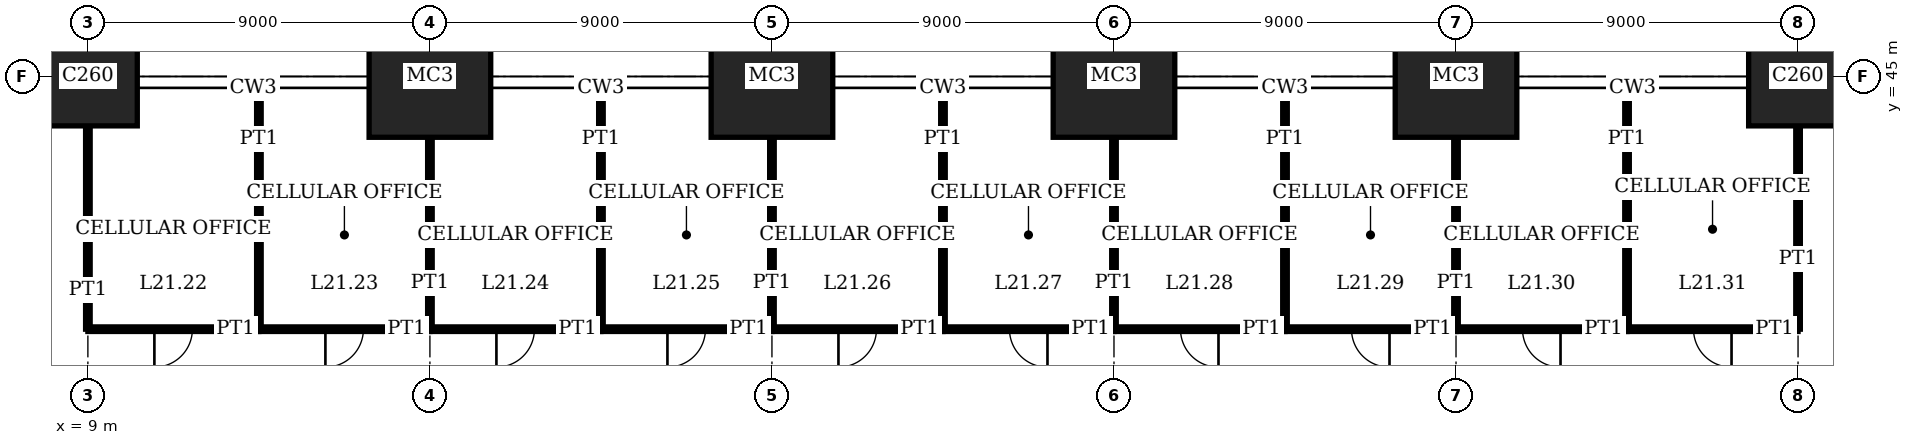
"""IFC4 building model, lengths in metres.
Left out: names, types, materials, properties, quantities, classifications, styles, units other than length and angle.
Written with IfcOpenShell. Run it as: python <this file> out.ifc"""

import sys

from ifc_helpers import new_model, si_unit, direction, frame, frame_2d, origin, origin_2d, place, context, subcontext, project, spatial, rectangle, extrude, element, fill, save


model = new_model("IFC4")
c1 = context("Model", 3, precision=1e-05, world=origin(), true_north=direction((0.0, 1.0)))
c2 = subcontext(c1, "Body", "Model", "MODEL_VIEW")
j1 = project(units=[si_unit("LENGTHUNIT", "METRE"), si_unit("PLANEANGLEUNIT", "RADIAN")], contexts=[c1])
p1 = place(None, origin())
s1 = spatial("IfcSite", under=j1, at=p1, CompositionType="ELEMENT")
p2 = place(p1, origin())
s2 = spatial("IfcBuilding", under=s1, at=p2, CompositionType="ELEMENT")
p3 = place(p2, frame((0.0, 0.0, 89.0)))
s3 = spatial("IfcBuildingStorey", under=s2, at=p3, CompositionType="ELEMENT", Elevation=89.0)
p4 = place(p3, frame((9.0, 45.0, 0.0), z_axis=(0.0, 0.0, 1.0), x_axis=(1.0, 0.0, 0.0)))
e1 = element("IfcColumn", 1, at=p4, inside=s3, PredefinedType="COLUMN", context=c2, shape_type="SweptSolid", body=[
    extrude(rectangle(XDim=2.6, YDim=2.6, at=origin_2d()), origin(), (0.0, 0.0, 1.0), 4.0),
])
for number, where, z_axis, x_axis in (
    (2, (18.0, 45.0, 0.0), (0.0, 0.0, 1.0), (1.0, 0.0, 0.0)),
    (3, (27.0, 45.0, 0.0), (0.0, 0.0, 1.0), (1.0, 0.0, 0.0)),
    (4, (36.0, 45.0, 0.0), (0.0, 0.0, 1.0), (1.0, 0.0, 0.0)),
    (5, (45.0, 45.0, 0.0), (0.0, 0.0, 1.0), (1.0, 0.0, 0.0)),
):
    element("IfcColumn", number, at=place(p3, frame(where, z_axis=z_axis, x_axis=x_axis)), inside=s3, PredefinedType="COLUMN", context=c2, shape_type="SweptSolid", body=[
        extrude(rectangle(XDim=3.2, YDim=3.2, at=origin_2d()), origin(), (0.0, 0.0, 1.0), 4.0),
    ])
p5 = place(p3, frame((54.0, 45.0, 0.0), z_axis=(0.0, 0.0, 1.0), x_axis=(1.0, 0.0, 0.0)))
e6 = element("IfcColumn", 6, at=p5, inside=s3, PredefinedType="COLUMN", context=c2, shape_type="SweptSolid", body=[
    extrude(rectangle(XDim=2.6, YDim=2.6, at=origin_2d()), origin(), (0.0, 0.0, 1.0), 4.0),
])
p6 = place(p3, frame((9.0, 38.35, 0.0), z_axis=(0.0, 0.0, 1.0), x_axis=(1.0, 0.0, 0.0)))
e7 = element("IfcWall", 7, at=p6, inside=s3, PredefinedType="PARTITIONING", context=c2, shape_type="SweptSolid", body=[
    extrude(rectangle(XDim=4.5, YDim=0.12, at=frame_2d((2.25, 0.0))), origin(), (0.0, 0.0, 1.0), 3.75),
])
p7 = place(p6, frame((1.75, 0.0, 0.0)))
e8 = element("IfcOpeningElement", 8, at=p7, cuts=e7, PredefinedType="OPENING", context=c2, shape_type="SweptSolid", body=[
    extrude(rectangle(XDim=1.0, YDim=2.4, at=frame_2d((0.5, 1.2))), frame((0.0, 0.07, 0.0), z_axis=(0.0, -1.0, 0.0), x_axis=(1.0, 0.0, 0.0)), (0.0, 0.0, 1.0), 0.14),
])
p8 = place(p3, frame((13.5, 38.35, 0.0), z_axis=(0.0, 0.0, 1.0), x_axis=(1.0, 0.0, 0.0)))
e9 = element("IfcWall", 9, at=p8, inside=s3, PredefinedType="PARTITIONING", context=c2, shape_type="SweptSolid", body=[
    extrude(rectangle(XDim=4.5, YDim=0.12, at=frame_2d((2.25, 0.0))), origin(), (0.0, 0.0, 1.0), 3.75),
])
p9 = place(p8, frame((1.75, 0.0, 0.0)))
e10 = element("IfcOpeningElement", 10, at=p9, cuts=e9, PredefinedType="OPENING", context=c2, shape_type="SweptSolid", body=[
    extrude(rectangle(XDim=1.0, YDim=2.4, at=frame_2d((0.5, 1.2))), frame((0.0, 0.07, 0.0), z_axis=(0.0, -1.0, 0.0), x_axis=(1.0, 0.0, 0.0)), (0.0, 0.0, 1.0), 0.14),
])
p10 = place(p3, frame((18.0, 38.35, 0.0), z_axis=(0.0, 0.0, 1.0), x_axis=(1.0, 0.0, 0.0)))
e11 = element("IfcWall", 11, at=p10, inside=s3, PredefinedType="PARTITIONING", context=c2, shape_type="SweptSolid", body=[
    extrude(rectangle(XDim=4.5, YDim=0.12, at=frame_2d((2.25, 0.0))), origin(), (0.0, 0.0, 1.0), 3.75),
])
p11 = place(p10, frame((1.75, 0.0, 0.0)))
e12 = element("IfcOpeningElement", 12, at=p11, cuts=e11, PredefinedType="OPENING", context=c2, shape_type="SweptSolid", body=[
    extrude(rectangle(XDim=1.0, YDim=2.4, at=frame_2d((0.5, 1.2))), frame((0.0, 0.07, 0.0), z_axis=(0.0, -1.0, 0.0), x_axis=(1.0, 0.0, 0.0)), (0.0, 0.0, 1.0), 0.14),
])
p12 = place(p3, frame((22.5, 38.35, 0.0), z_axis=(0.0, 0.0, 1.0), x_axis=(1.0, 0.0, 0.0)))
e13 = element("IfcWall", 13, at=p12, inside=s3, PredefinedType="PARTITIONING", context=c2, shape_type="SweptSolid", body=[
    extrude(rectangle(XDim=4.5, YDim=0.12, at=frame_2d((2.25, 0.0))), origin(), (0.0, 0.0, 1.0), 3.75),
])
p13 = place(p12, frame((1.75, 0.0, 0.0)))
e14 = element("IfcOpeningElement", 14, at=p13, cuts=e13, PredefinedType="OPENING", context=c2, shape_type="SweptSolid", body=[
    extrude(rectangle(XDim=1.0, YDim=2.4, at=frame_2d((0.5, 1.2))), frame((0.0, 0.07, 0.0), z_axis=(0.0, -1.0, 0.0), x_axis=(1.0, 0.0, 0.0)), (0.0, 0.0, 1.0), 0.14),
])
p14 = place(p3, frame((27.0, 38.35, 0.0), z_axis=(0.0, 0.0, 1.0), x_axis=(1.0, 0.0, 0.0)))
e15 = element("IfcWall", 15, at=p14, inside=s3, PredefinedType="PARTITIONING", context=c2, shape_type="SweptSolid", body=[
    extrude(rectangle(XDim=4.5, YDim=0.12, at=frame_2d((2.25, 0.0))), origin(), (0.0, 0.0, 1.0), 3.75),
])
p15 = place(p14, frame((1.75, 0.0, 0.0)))
e16 = element("IfcOpeningElement", 16, at=p15, cuts=e15, PredefinedType="OPENING", context=c2, shape_type="SweptSolid", body=[
    extrude(rectangle(XDim=1.0, YDim=2.4, at=frame_2d((0.5, 1.2))), frame((0.0, 0.07, 0.0), z_axis=(0.0, -1.0, 0.0), x_axis=(1.0, 0.0, 0.0)), (0.0, 0.0, 1.0), 0.14),
])
p16 = place(p3, frame((31.5, 38.35, 0.0), z_axis=(0.0, 0.0, 1.0), x_axis=(1.0, 0.0, 0.0)))
e17 = element("IfcWall", 17, at=p16, inside=s3, PredefinedType="PARTITIONING", context=c2, shape_type="SweptSolid", body=[
    extrude(rectangle(XDim=4.5, YDim=0.12, at=frame_2d((2.25, 0.0))), origin(), (0.0, 0.0, 1.0), 3.75),
])
p17 = place(p16, frame((1.75, 0.0, 0.0)))
e18 = element("IfcOpeningElement", 18, at=p17, cuts=e17, PredefinedType="OPENING", context=c2, shape_type="SweptSolid", body=[
    extrude(rectangle(XDim=1.0, YDim=2.4, at=frame_2d((0.5, 1.2))), frame((0.0, 0.07, 0.0), z_axis=(0.0, -1.0, 0.0), x_axis=(1.0, 0.0, 0.0)), (0.0, 0.0, 1.0), 0.14),
])
p18 = place(p3, frame((36.0, 38.35, 0.0), z_axis=(0.0, 0.0, 1.0), x_axis=(1.0, 0.0, 0.0)))
e19 = element("IfcWall", 19, at=p18, inside=s3, PredefinedType="PARTITIONING", context=c2, shape_type="SweptSolid", body=[
    extrude(rectangle(XDim=4.5, YDim=0.12, at=frame_2d((2.25, 0.0))), origin(), (0.0, 0.0, 1.0), 3.75),
])
p19 = place(p18, frame((1.75, 0.0, 0.0)))
e20 = element("IfcOpeningElement", 20, at=p19, cuts=e19, PredefinedType="OPENING", context=c2, shape_type="SweptSolid", body=[
    extrude(rectangle(XDim=1.0, YDim=2.4, at=frame_2d((0.5, 1.2))), frame((0.0, 0.07, 0.0), z_axis=(0.0, -1.0, 0.0), x_axis=(1.0, 0.0, 0.0)), (0.0, 0.0, 1.0), 0.14),
])
p20 = place(p3, frame((40.5, 38.35, 0.0), z_axis=(0.0, 0.0, 1.0), x_axis=(1.0, 0.0, 0.0)))
e21 = element("IfcWall", 21, at=p20, inside=s3, PredefinedType="PARTITIONING", context=c2, shape_type="SweptSolid", body=[
    extrude(rectangle(XDim=4.5, YDim=0.12, at=frame_2d((2.25, 0.0))), origin(), (0.0, 0.0, 1.0), 3.75),
])
p21 = place(p20, frame((1.75, 0.0, 0.0)))
e22 = element("IfcOpeningElement", 22, at=p21, cuts=e21, PredefinedType="OPENING", context=c2, shape_type="SweptSolid", body=[
    extrude(rectangle(XDim=1.0, YDim=2.4, at=frame_2d((0.5, 1.2))), frame((0.0, 0.07, 0.0), z_axis=(0.0, -1.0, 0.0), x_axis=(1.0, 0.0, 0.0)), (0.0, 0.0, 1.0), 0.14),
])
p22 = place(p3, frame((45.0, 38.35, 0.0), z_axis=(0.0, 0.0, 1.0), x_axis=(1.0, 0.0, 0.0)))
e23 = element("IfcWall", 23, at=p22, inside=s3, PredefinedType="PARTITIONING", context=c2, shape_type="SweptSolid", body=[
    extrude(rectangle(XDim=4.5, YDim=0.12, at=frame_2d((2.25, 0.0))), origin(), (0.0, 0.0, 1.0), 3.75),
])
p23 = place(p22, frame((1.75, 0.0, 0.0)))
e24 = element("IfcOpeningElement", 24, at=p23, cuts=e23, PredefinedType="OPENING", context=c2, shape_type="SweptSolid", body=[
    extrude(rectangle(XDim=1.0, YDim=2.4, at=frame_2d((0.5, 1.2))), frame((0.0, 0.07, 0.0), z_axis=(0.0, -1.0, 0.0), x_axis=(1.0, 0.0, 0.0)), (0.0, 0.0, 1.0), 0.14),
])
p24 = place(p3, frame((49.5, 38.35, 0.0), z_axis=(0.0, 0.0, 1.0), x_axis=(1.0, 0.0, 0.0)))
e25 = element("IfcWall", 25, at=p24, inside=s3, PredefinedType="PARTITIONING", context=c2, shape_type="SweptSolid", body=[
    extrude(rectangle(XDim=4.5, YDim=0.12, at=frame_2d((2.25, 0.0))), origin(), (0.0, 0.0, 1.0), 3.75),
])
p25 = place(p24, frame((1.75, 0.0, 0.0)))
e26 = element("IfcOpeningElement", 26, at=p25, cuts=e25, PredefinedType="OPENING", context=c2, shape_type="SweptSolid", body=[
    extrude(rectangle(XDim=1.0, YDim=2.4, at=frame_2d((0.5, 1.2))), frame((0.0, 0.07, 0.0), z_axis=(0.0, -1.0, 0.0), x_axis=(1.0, 0.0, 0.0)), (0.0, 0.0, 1.0), 0.14),
])
p26 = place(p3, frame((9.0, 38.35, 0.0), z_axis=(0.0, 0.0, 1.0), x_axis=(0.0, 1.0, 0.0)))
e27 = element("IfcWall", 27, at=p26, inside=s3, PredefinedType="PARTITIONING", context=c2, shape_type="SweptSolid", body=[
    extrude(rectangle(XDim=5.35, YDim=0.12, at=frame_2d((2.675, 0.0))), origin(), (0.0, 0.0, 1.0), 3.05),
])
p27 = place(p3, frame((13.5, 38.35, 0.0), z_axis=(0.0, 0.0, 1.0), x_axis=(0.0, 1.0, 0.0)))
e28 = element("IfcWall", 28, at=p27, inside=s3, PredefinedType="PARTITIONING", context=c2, shape_type="SweptSolid", body=[
    extrude(rectangle(XDim=6.34, YDim=0.12, at=frame_2d((3.17, 0.0))), origin(), (0.0, 0.0, 1.0), 3.75),
])
p28 = place(p3, frame((18.0, 38.35, 0.0), z_axis=(0.0, 0.0, 1.0), x_axis=(0.0, 1.0, 0.0)))
e29 = element("IfcWall", 29, at=p28, inside=s3, PredefinedType="PARTITIONING", context=c2, shape_type="SweptSolid", body=[
    extrude(rectangle(XDim=5.05, YDim=0.12, at=frame_2d((2.525, 0.0))), origin(), (0.0, 0.0, 1.0), 3.05),
])
p29 = place(p3, frame((22.5, 38.35, 0.0), z_axis=(0.0, 0.0, 1.0), x_axis=(0.0, 1.0, 0.0)))
e30 = element("IfcWall", 30, at=p29, inside=s3, PredefinedType="PARTITIONING", context=c2, shape_type="SweptSolid", body=[
    extrude(rectangle(XDim=6.34, YDim=0.12, at=frame_2d((3.17, 0.0))), origin(), (0.0, 0.0, 1.0), 3.75),
])
p30 = place(p3, frame((27.0, 38.35, 0.0), z_axis=(0.0, 0.0, 1.0), x_axis=(0.0, 1.0, 0.0)))
e31 = element("IfcWall", 31, at=p30, inside=s3, PredefinedType="PARTITIONING", context=c2, shape_type="SweptSolid", body=[
    extrude(rectangle(XDim=5.05, YDim=0.12, at=frame_2d((2.525, 0.0))), origin(), (0.0, 0.0, 1.0), 3.05),
])
p31 = place(p3, frame((31.5, 38.35, 0.0), z_axis=(0.0, 0.0, 1.0), x_axis=(0.0, 1.0, 0.0)))
e32 = element("IfcWall", 32, at=p31, inside=s3, PredefinedType="PARTITIONING", context=c2, shape_type="SweptSolid", body=[
    extrude(rectangle(XDim=6.34, YDim=0.12, at=frame_2d((3.17, 0.0))), origin(), (0.0, 0.0, 1.0), 3.75),
])
p32 = place(p3, frame((36.0, 38.35, 0.0), z_axis=(0.0, 0.0, 1.0), x_axis=(0.0, 1.0, 0.0)))
e33 = element("IfcWall", 33, at=p32, inside=s3, PredefinedType="PARTITIONING", context=c2, shape_type="SweptSolid", body=[
    extrude(rectangle(XDim=5.05, YDim=0.12, at=frame_2d((2.525, 0.0))), origin(), (0.0, 0.0, 1.0), 3.05),
])
p33 = place(p3, frame((40.5, 38.35, 0.0), z_axis=(0.0, 0.0, 1.0), x_axis=(0.0, 1.0, 0.0)))
e34 = element("IfcWall", 34, at=p33, inside=s3, PredefinedType="PARTITIONING", context=c2, shape_type="SweptSolid", body=[
    extrude(rectangle(XDim=6.34, YDim=0.12, at=frame_2d((3.17, 0.0))), origin(), (0.0, 0.0, 1.0), 3.75),
])
p34 = place(p3, frame((45.0, 38.35, 0.0), z_axis=(0.0, 0.0, 1.0), x_axis=(0.0, 1.0, 0.0)))
e35 = element("IfcWall", 35, at=p34, inside=s3, PredefinedType="PARTITIONING", context=c2, shape_type="SweptSolid", body=[
    extrude(rectangle(XDim=5.05, YDim=0.12, at=frame_2d((2.525, 0.0))), origin(), (0.0, 0.0, 1.0), 3.05),
])
p35 = place(p3, frame((49.5, 38.35, 0.0), z_axis=(0.0, 0.0, 1.0), x_axis=(0.0, 1.0, 0.0)))
e36 = element("IfcWall", 36, at=p35, inside=s3, PredefinedType="PARTITIONING", context=c2, shape_type="SweptSolid", body=[
    extrude(rectangle(XDim=6.34, YDim=0.12, at=frame_2d((3.17, 0.0))), origin(), (0.0, 0.0, 1.0), 3.75),
])
p36 = place(p3, frame((54.0, 38.35, 0.0), z_axis=(0.0, 0.0, 1.0), x_axis=(0.0, 1.0, 0.0)))
e37 = element("IfcWall", 37, at=p36, inside=s3, PredefinedType="PARTITIONING", context=c2, shape_type="SweptSolid", body=[
    extrude(rectangle(XDim=5.35, YDim=0.12, at=frame_2d((2.675, 0.0))), origin(), (0.0, 0.0, 1.0), 3.05),
])
p37 = place(p7, origin())
e38 = element("IfcDoor", 38, at=p37, inside=s3, OperationType="SINGLE_SWING_LEFT", PredefinedType="DOOR", context=c2, shape_type="SweptSolid", body=[
    extrude(rectangle(XDim=1.0, YDim=2.4, at=frame_2d((0.5, 1.2))), frame((0.0, 0.025, 0.0), z_axis=(0.0, -1.0, 0.0), x_axis=(1.0, 0.0, 0.0)), (0.0, 0.0, 1.0), 0.05),
])
fill(e8, e38)
p38 = place(p9, origin())
e39 = element("IfcDoor", 39, at=p38, inside=s3, OperationType="SINGLE_SWING_LEFT", PredefinedType="DOOR", context=c2, shape_type="SweptSolid", body=[
    extrude(rectangle(XDim=1.0, YDim=2.4, at=frame_2d((0.5, 1.2))), frame((0.0, 0.025, 0.0), z_axis=(0.0, -1.0, 0.0), x_axis=(1.0, 0.0, 0.0)), (0.0, 0.0, 1.0), 0.05),
])
fill(e10, e39)
p39 = place(p11, origin())
e40 = element("IfcDoor", 40, at=p39, inside=s3, OperationType="SINGLE_SWING_LEFT", PredefinedType="DOOR", context=c2, shape_type="SweptSolid", body=[
    extrude(rectangle(XDim=1.0, YDim=2.4, at=frame_2d((0.5, 1.2))), frame((0.0, 0.025, 0.0), z_axis=(0.0, -1.0, 0.0), x_axis=(1.0, 0.0, 0.0)), (0.0, 0.0, 1.0), 0.05),
])
fill(e12, e40)
p40 = place(p13, origin())
e41 = element("IfcDoor", 41, at=p40, inside=s3, OperationType="SINGLE_SWING_LEFT", PredefinedType="DOOR", context=c2, shape_type="SweptSolid", body=[
    extrude(rectangle(XDim=1.0, YDim=2.4, at=frame_2d((0.5, 1.2))), frame((0.0, 0.025, 0.0), z_axis=(0.0, -1.0, 0.0), x_axis=(1.0, 0.0, 0.0)), (0.0, 0.0, 1.0), 0.05),
])
fill(e14, e41)
p41 = place(p15, origin())
e42 = element("IfcDoor", 42, at=p41, inside=s3, OperationType="SINGLE_SWING_LEFT", PredefinedType="DOOR", context=c2, shape_type="SweptSolid", body=[
    extrude(rectangle(XDim=1.0, YDim=2.4, at=frame_2d((0.5, 1.2))), frame((0.0, 0.025, 0.0), z_axis=(0.0, -1.0, 0.0), x_axis=(1.0, 0.0, 0.0)), (0.0, 0.0, 1.0), 0.05),
])
fill(e16, e42)
p42 = place(p17, origin())
e43 = element("IfcDoor", 43, at=p42, inside=s3, OperationType="SINGLE_SWING_RIGHT", PredefinedType="DOOR", context=c2, shape_type="SweptSolid", body=[
    extrude(rectangle(XDim=1.0, YDim=2.4, at=frame_2d((0.5, 1.2))), frame((0.0, 0.025, 0.0), z_axis=(0.0, -1.0, 0.0), x_axis=(1.0, 0.0, 0.0)), (0.0, 0.0, 1.0), 0.05),
])
fill(e18, e43)
p43 = place(p19, origin())
e44 = element("IfcDoor", 44, at=p43, inside=s3, OperationType="SINGLE_SWING_RIGHT", PredefinedType="DOOR", context=c2, shape_type="SweptSolid", body=[
    extrude(rectangle(XDim=1.0, YDim=2.4, at=frame_2d((0.5, 1.2))), frame((0.0, 0.025, 0.0), z_axis=(0.0, -1.0, 0.0), x_axis=(1.0, 0.0, 0.0)), (0.0, 0.0, 1.0), 0.05),
])
fill(e20, e44)
p44 = place(p21, origin())
e45 = element("IfcDoor", 45, at=p44, inside=s3, OperationType="SINGLE_SWING_RIGHT", PredefinedType="DOOR", context=c2, shape_type="SweptSolid", body=[
    extrude(rectangle(XDim=1.0, YDim=2.4, at=frame_2d((0.5, 1.2))), frame((0.0, 0.025, 0.0), z_axis=(0.0, -1.0, 0.0), x_axis=(1.0, 0.0, 0.0)), (0.0, 0.0, 1.0), 0.05),
])
fill(e22, e45)
p45 = place(p23, origin())
e46 = element("IfcDoor", 46, at=p45, inside=s3, OperationType="SINGLE_SWING_RIGHT", PredefinedType="DOOR", context=c2, shape_type="SweptSolid", body=[
    extrude(rectangle(XDim=1.0, YDim=2.4, at=frame_2d((0.5, 1.2))), frame((0.0, 0.025, 0.0), z_axis=(0.0, -1.0, 0.0), x_axis=(1.0, 0.0, 0.0)), (0.0, 0.0, 1.0), 0.05),
])
fill(e24, e46)
p46 = place(p25, origin())
e47 = element("IfcDoor", 47, at=p46, inside=s3, OperationType="SINGLE_SWING_RIGHT", PredefinedType="DOOR", context=c2, shape_type="SweptSolid", body=[
    extrude(rectangle(XDim=1.0, YDim=2.4, at=frame_2d((0.5, 1.2))), frame((0.0, 0.025, 0.0), z_axis=(0.0, -1.0, 0.0), x_axis=(1.0, 0.0, 0.0)), (0.0, 0.0, 1.0), 0.05),
])
fill(e26, e47)
save(model, sys.argv[1])
